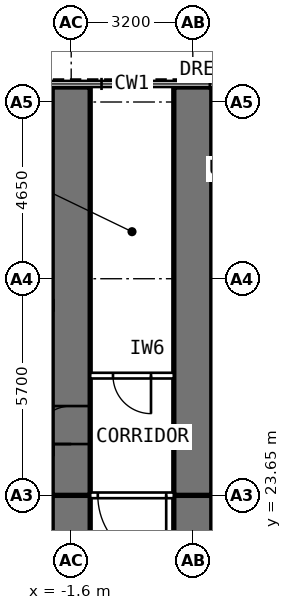
"""IFC4 building model, lengths in metres.
Left out: names, types, materials, properties, quantities, classifications, styles, units other than length and angle.
Written with IfcOpenShell. Run it as: python <this file> out.ifc"""

import sys

from ifc_helpers import new_model, si_unit, direction, frame, frame_2d, origin, place, context, subcontext, project, spatial, rectangle, extrude, element, fill, save


model = new_model("IFC4")
c1 = context("Model", 3, precision=1e-05, world=origin(), true_north=direction((0.0, 1.0)))
c2 = subcontext(c1, "Body", "Model", "MODEL_VIEW")
j1 = project(units=[si_unit("LENGTHUNIT", "METRE"), si_unit("PLANEANGLEUNIT", "RADIAN")], contexts=[c1])
p1 = place(None, origin())
s1 = spatial("IfcSite", under=j1, at=p1, CompositionType="ELEMENT")
p2 = place(p1, origin())
s2 = spatial("IfcBuilding", under=s1, at=p2, CompositionType="ELEMENT")
p3 = place(p2, frame((0.0, 0.0, 95.2)))
s3 = spatial("IfcBuildingStorey", under=s2, at=p3, CompositionType="ELEMENT", Elevation=95.2)
p4 = place(p3, frame((-1.6, 17.95, 0.0), z_axis=(0.0, 0.0, 1.0), x_axis=(0.0, 1.0, 0.0)))
e1 = element("IfcWall", 1, at=p4, inside=s3, PredefinedType="SHEAR", context=c2, shape_type="SweptSolid", body=[
    extrude(rectangle(XDim=5.7, YDim=1.0, at=frame_2d((2.85, 0.0))), origin(), (0.0, 0.0, 1.0), 3.6),
])
p5 = place(p4, frame((0.9, 0.0, 0.0)))
e2 = element("IfcOpeningElement", 2, at=p5, cuts=e1, PredefinedType="OPENING", context=c2, shape_type="SweptSolid", body=[
    extrude(rectangle(XDim=1.0, YDim=2.1, at=frame_2d((0.5, 1.05))), frame((0.0, 0.512, 0.0), z_axis=(0.0, -1.0, 0.0), x_axis=(1.0, 0.0, 0.0)), (0.0, 0.0, 1.0), 1.024),
])
p6 = place(p3, frame((-1.6, 23.65, 0.0), z_axis=(0.0, 0.0, 1.0), x_axis=(0.0, 1.0, 0.0)))
e3 = element("IfcWall", 3, at=p6, inside=s3, PredefinedType="SHEAR", context=c2, shape_type="SweptSolid", body=[
    extrude(rectangle(XDim=10.745, YDim=1.0, at=frame_2d((5.373, 0.0))), origin(), (0.0, 0.0, 1.0), 3.6),
])
p7 = place(p6, frame((1.35, 0.0, 0.0)))
e4 = element("IfcOpeningElement", 4, at=p7, cuts=e3, PredefinedType="OPENING", context=c2, shape_type="SweptSolid", body=[
    extrude(rectangle(XDim=1.0, YDim=2.1, at=frame_2d((0.5, 1.05))), frame((0.0, 0.512, 0.0), z_axis=(0.0, -1.0, 0.0), x_axis=(1.0, 0.0, 0.0)), (0.0, 0.0, 1.0), 1.024),
])
p8 = place(p3, frame((1.6, 17.95, 0.0), z_axis=(0.0, 0.0, 1.0), x_axis=(0.0, 1.0, 0.0)))
e5 = element("IfcWall", 5, at=p8, inside=s3, PredefinedType="SHEAR", context=c2, shape_type="SweptSolid", body=[
    extrude(rectangle(XDim=5.7, YDim=1.0, at=frame_2d((2.85, 0.0))), origin(), (0.0, 0.0, 1.0), 3.6),
])
p9 = place(p8, frame((0.9, 0.0, 0.0)))
e6 = element("IfcOpeningElement", 6, at=p9, cuts=e5, PredefinedType="OPENING", context=c2, shape_type="SweptSolid", body=[
    extrude(rectangle(XDim=1.0, YDim=2.1, at=frame_2d((0.5, 1.05))), frame((0.0, 0.512, 0.0), z_axis=(0.0, -1.0, 0.0), x_axis=(1.0, 0.0, 0.0)), (0.0, 0.0, 1.0), 1.024),
])
p10 = place(p3, frame((1.6, 23.65, 0.0), z_axis=(0.0, 0.0, 1.0), x_axis=(0.0, 1.0, 0.0)))
e7 = element("IfcWall", 7, at=p10, inside=s3, PredefinedType="SHEAR", context=c2, shape_type="SweptSolid", body=[
    extrude(rectangle(XDim=10.745, YDim=1.0, at=frame_2d((5.373, 0.0))), origin(), (0.0, 0.0, 1.0), 3.6),
])
p11 = place(p3, frame((1.1, 26.8, 0.0), z_axis=(0.0, 0.0, 1.0), x_axis=(-1.0, 0.0, 0.0)))
e8 = element("IfcWall", 8, at=p11, inside=s3, PredefinedType="PARTITIONING", context=c2, shape_type="SweptSolid", body=[
    extrude(rectangle(XDim=2.2, YDim=0.15, at=frame_2d((1.1, 0.0))), origin(), (0.0, 0.0, 1.0), 3.35),
])
p12 = place(p11, frame((0.6, 0.0, 0.0)))
e9 = element("IfcOpeningElement", 9, at=p12, cuts=e8, PredefinedType="OPENING", context=c2, shape_type="SweptSolid", body=[
    extrude(rectangle(XDim=1.0, YDim=2.1, at=frame_2d((0.5, 1.05))), frame((0.0, 0.087, 0.0), z_axis=(0.0, -1.0, 0.0), x_axis=(1.0, 0.0, 0.0)), (0.0, 0.0, 1.0), 0.174),
])
p13 = place(p3, frame((1.1, 23.65, 0.0), z_axis=(0.0, 0.0, 1.0), x_axis=(-1.0, 0.0, 0.0)))
e10 = element("IfcWall", 10, at=p13, inside=s3, PredefinedType="PARTITIONING", context=c2, shape_type="SweptSolid", body=[
    extrude(rectangle(XDim=2.2, YDim=0.15, at=frame_2d((1.1, 0.0))), origin(), (0.0, 0.0, 1.0), 3.35),
])
p14 = place(p13, frame((0.2, 0.0, 0.0)))
e11 = element("IfcOpeningElement", 11, at=p14, cuts=e10, PredefinedType="OPENING", context=c2, shape_type="SweptSolid", body=[
    extrude(rectangle(XDim=1.8, YDim=2.1, at=frame_2d((0.9, 1.05))), frame((0.0, 0.087, 0.0), z_axis=(0.0, -1.0, 0.0), x_axis=(1.0, 0.0, 0.0)), (0.0, 0.0, 1.0), 0.174),
])
p15 = place(p12, origin())
e12 = element("IfcDoor", 12, at=p15, inside=s3, OperationType="SINGLE_SWING_LEFT", PredefinedType="DOOR", context=c2, shape_type="SweptSolid", body=[
    extrude(rectangle(XDim=1.0, YDim=2.1, at=frame_2d((0.5, 1.05))), frame((0.0, 0.025, 0.0), z_axis=(0.0, -1.0, 0.0), x_axis=(1.0, 0.0, 0.0)), (0.0, 0.0, 1.0), 0.05),
])
fill(e9, e12)
p16 = place(p14, origin())
e13 = element("IfcDoor", 13, at=p16, inside=s3, OperationType="DOUBLE_DOOR_DOUBLE_SWING", PredefinedType="DOOR", context=c2, shape_type="SweptSolid", body=[
    extrude(rectangle(XDim=1.8, YDim=2.1, at=frame_2d((0.9, 1.05))), frame((0.0, 0.025, 0.0), z_axis=(0.0, -1.0, 0.0), x_axis=(1.0, 0.0, 0.0)), (0.0, 0.0, 1.0), 0.05),
])
fill(e11, e13)
p17 = place(p7, origin())
e14 = element("IfcDoor", 14, at=p17, inside=s3, OperationType="SINGLE_SWING_LEFT", PredefinedType="DOOR", context=c2, shape_type="SweptSolid", body=[
    extrude(rectangle(XDim=1.0, YDim=2.1, at=frame_2d((0.5, 1.05))), frame((0.0, 0.25, 0.0), z_axis=(0.0, -1.0, 0.0), x_axis=(1.0, 0.0, 0.0)), (0.0, 0.0, 1.0), 0.5),
])
fill(e4, e14)
save(model, sys.argv[1])
